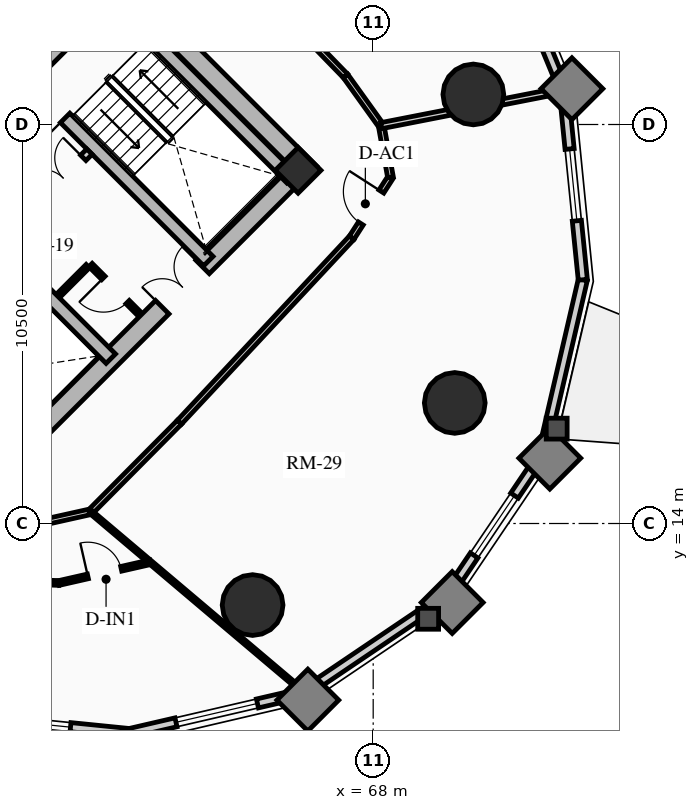
"""IFC4 building model, lengths in metres.
Left out: names, types, materials, properties, quantities, classifications, styles, units other than length and angle.
Written with IfcOpenShell. Run it as: python <this file> out.ifc"""

import sys

from ifc_helpers import new_model, si_unit, direction, frame, frame_2d, origin, origin_2d, place, context, subcontext, project, spatial, rectangle, circle, extrude, source, transform, mapped, element, fill, save


model = new_model("IFC4")
c1 = context("Model", 3, precision=1e-05, world=origin(), true_north=direction((0.0, 1.0)))
c2 = subcontext(c1, "Body", "Model", "MODEL_VIEW")
j1 = project(units=[si_unit("LENGTHUNIT", "METRE"), si_unit("PLANEANGLEUNIT", "RADIAN")], contexts=[c1])
p1 = place(None, origin())
s1 = spatial("IfcSite", under=j1, at=p1, CompositionType="ELEMENT")
p2 = place(p1, origin())
s2 = spatial("IfcBuilding", under=s1, at=p2, CompositionType="ELEMENT")
p3 = place(p2, frame((0.0, 0.0, 22.0)))
s3 = spatial("IfcBuildingStorey", under=s2, at=p3, CompositionType="ELEMENT", Elevation=22.0)
p4 = place(p3, frame((66.339, 23.227, 0.0), z_axis=(0.0, 0.0, 1.0), x_axis=(-0.707106781187, 0.707106781187, 0.0)))
e1 = element("IfcWall", 1, at=p4, inside=s3, PredefinedType="SHEAR", context=c2, shape_type="SweptSolid", body=[
    extrude(rectangle(XDim=14.3, YDim=0.5, at=frame_2d((7.15, 0.0))), origin(), (0.0, 0.0, 1.0), 2.91),
])
p5 = place(p3, frame((58.596, 15.838, 0.0), z_axis=(0.0, 0.0, 1.0), x_axis=(0.707106781187, 0.707106781187, 0.0)))
e2 = element("IfcWall", 2, at=p5, inside=s3, PredefinedType="SHEAR", context=c2, shape_type="SweptSolid", body=[
    extrude(rectangle(XDim=10.7, YDim=0.5, at=frame_2d((5.35, 0.0))), origin(), (0.0, 0.0, 1.0), 2.91),
])
m1 = source(origin(), c2, "Body", "SweptSolid", [
    extrude(rectangle(XDim=1.5, YDim=2.02, at=frame_2d((0.75, 1.01))), frame((0.0, 0.26, 0.0), z_axis=(0.0, -1.0, 0.0), x_axis=(1.0, 0.0, 0.0)), (0.0, 0.0, 1.0), 0.52),
])
p6 = place(p5, frame((5.45, 0.0, 0.0)))
e3 = element("IfcOpeningElement", 3, at=p6, cuts=e2, PredefinedType="OPENING", context=c2, shape_type="MappedRepresentation", body=[
    mapped(m1, transform((0.0, 0.0, 0.0), x_axis=(1.0, 0.0, 0.0), y_axis=(0.0, 1.0, 0.0), z_axis=(0.0, 0.0, 1.0), scale=1.0)),
])
p7 = place(p3, frame((61.096, 18.338, 0.0), z_axis=(0.0, 0.0, 1.0), x_axis=(-0.707106781187, 0.707106781187, 0.0)))
e4 = element("IfcWall", 4, at=p7, inside=s3, PredefinedType="SHEAR", context=c2, shape_type="SweptSolid", body=[
    extrude(rectangle(XDim=13.8, YDim=0.35, at=frame_2d((6.9, 0.0))), origin(), (0.0, 0.0, 1.0), 2.91),
])
m2 = source(origin(), c2, "Body", "SweptSolid", [
    extrude(rectangle(XDim=1.1, YDim=2.015, at=frame_2d((0.55, 1.007))), frame((0.0, 0.185, 0.0), z_axis=(0.0, -1.0, 0.0), x_axis=(1.0, 0.0, 0.0)), (0.0, 0.0, 1.0), 0.37),
])
p8 = place(p7, frame((4.9, 0.0, 0.0)))
e5 = element("IfcOpeningElement", 5, at=p8, cuts=e4, PredefinedType="OPENING", context=c2, shape_type="MappedRepresentation", body=[
    mapped(m2, transform((0.0, 0.0, 0.0), x_axis=(1.0, 0.0, 0.0), y_axis=(0.0, 1.0, 0.0), z_axis=(0.0, 0.0, 1.0), scale=1.0)),
])
m3 = source(origin(), c2, "Body", "SweptSolid", [
    extrude(rectangle(XDim=1.15, YDim=2.02, at=frame_2d((0.575, 1.01))), frame((0.0, 0.185, 0.0), z_axis=(0.0, -1.0, 0.0), x_axis=(1.0, 0.0, 0.0)), (0.0, 0.0, 1.0), 0.37),
])
p9 = place(p7, frame((7.32, 0.0, 0.0)))
e6 = element("IfcOpeningElement", 6, at=p9, cuts=e4, PredefinedType="OPENING", context=c2, shape_type="MappedRepresentation", body=[
    mapped(m3, transform((0.0, 0.0, 0.0), x_axis=(1.0, 0.0, 0.0), y_axis=(0.0, 1.0, 0.0), z_axis=(0.0, 0.0, 1.0), scale=1.0)),
])
p10 = place(p3, frame((63.662, 20.904, 0.0), z_axis=(0.0, 0.0, 1.0), x_axis=(-0.707106781187, 0.707106781187, 0.0)))
e7 = element("IfcWall", 7, at=p10, inside=s3, PredefinedType="SHEAR", context=c2, shape_type="SweptSolid", body=[
    extrude(rectangle(XDim=13.8, YDim=0.35, at=frame_2d((6.9, 0.0))), origin(), (0.0, 0.0, 1.0), 2.91),
])
p11 = place(p10, frame((10.025, 0.0, 0.0)))
e8 = element("IfcOpeningElement", 8, at=p11, cuts=e7, PredefinedType="OPENING", context=c2, shape_type="MappedRepresentation", body=[
    mapped(m2, transform((0.0, 0.0, 0.0), x_axis=(1.0, 0.0, 0.0), y_axis=(0.0, 1.0, 0.0), z_axis=(0.0, 0.0, 1.0), scale=1.0)),
])
p12 = place(p10, frame((12.025, 0.0, 0.0)))
e9 = element("IfcOpeningElement", 9, at=p12, cuts=e7, PredefinedType="OPENING", context=c2, shape_type="MappedRepresentation", body=[
    mapped(m2, transform((0.0, 0.0, 0.0), x_axis=(1.0, 0.0, 0.0), y_axis=(0.0, 1.0, 0.0), z_axis=(0.0, 0.0, 1.0), scale=1.0)),
])
p13 = place(p10, frame((5.33, 0.0, 0.0)))
e10 = element("IfcOpeningElement", 10, at=p13, cuts=e7, PredefinedType="OPENING", context=c2, shape_type="MappedRepresentation", body=[
    mapped(m3, transform((0.0, 0.0, 0.0), x_axis=(1.0, 0.0, 0.0), y_axis=(0.0, 1.0, 0.0), z_axis=(0.0, 0.0, 1.0), scale=1.0)),
])
p14 = place(p3, frame((65.847, 23.089, 0.0), z_axis=(0.0, 0.0, 1.0), x_axis=(-0.707106781187, 0.707106781187, 0.0)))
e11 = element("IfcWall", 11, at=p14, inside=s3, PredefinedType="SHEAR", context=c2, shape_type="SweptSolid", body=[
    extrude(rectangle(XDim=6.745, YDim=0.35, at=frame_2d((3.373, 0.0))), origin(), (0.0, 0.0, 1.0), 2.91),
])
p15 = place(p3, frame((58.893, 25.674, 0.0), z_axis=(0.0, 0.0, 1.0), x_axis=(0.707106781187, 0.707106781187, 0.0)))
e12 = element("IfcWall", 12, at=p15, inside=s3, PredefinedType="SHEAR", context=c2, shape_type="SweptSolid", body=[
    extrude(rectangle(XDim=3.285, YDim=0.35, at=frame_2d((1.643, 0.0))), origin(), (0.0, 0.0, 1.0), 2.91),
])
p16 = place(p3, frame((66.024, 23.294, 0.0), z_axis=(0.0, 0.0, 1.0), x_axis=(0.707106781187, 0.707106781187, 0.0)))
e13 = element("IfcColumn", 13, at=p16, inside=s3, PredefinedType="COLUMN", context=c2, shape_type="SweptSolid", body=[
    extrude(rectangle(XDim=0.85, YDim=0.85, at=origin_2d()), origin(), (0.0, 0.0, 1.0), 2.91),
])
for number, where, z_axis, x_axis in (
    (14, (64.827, 11.854, 0.0), (0.0, 0.0, 1.0), (1.0, 0.0, 0.0)),
    (15, (70.146, 17.173, 0.0), (0.0, 0.0, 1.0), (1.0, 0.0, 0.0)),
    (16, (70.635, 25.291, 0.0), (0.0, 0.0, 1.0), (1.0, 0.0, 0.0)),
):
    element("IfcColumn", number, at=place(p3, frame(where, z_axis=z_axis, x_axis=x_axis)), inside=s3, PredefinedType="USERDEFINED", context=c2, shape_type="SweptSolid", body=[
        extrude(circle(Radius=0.8, at=origin_2d()), origin(), (0.0, 0.0, 1.0), 2.91),
    ])
p17 = place(p3, frame((61.586, 8.484, 0.0), z_axis=(0.0, 0.0, 1.0), x_axis=(-0.994951574538, 0.100356187272, 0.0)))
e17 = element("IfcWall", 17, at=p17, inside=s3, PredefinedType="SOLIDWALL", context=c2, shape_type="SweptSolid", body=[
    extrude(rectangle(XDim=5.019, YDim=0.24, at=frame_2d((2.509, 0.0))), origin(), (0.0, 0.0, 1.0), 2.073),
])
m4 = source(origin(), c2, "Body", "SweptSolid", [
    extrude(rectangle(XDim=1.9, YDim=1.35, at=frame_2d((0.95, 0.675))), frame((0.0, 0.13, 0.0), z_axis=(0.0, -1.0, 0.0), x_axis=(1.0, 0.0, 0.0)), (0.0, 0.0, 1.0), 0.26),
])
p18 = place(p17, frame((1.559, 0.0, 0.65)))
e18 = element("IfcOpeningElement", 18, at=p18, cuts=e17, PredefinedType="OPENING", context=c2, shape_type="MappedRepresentation", body=[
    mapped(m4, transform((0.0, 0.0, 0.0), x_axis=(1.0, 0.0, 0.0), y_axis=(0.0, 1.0, 0.0), z_axis=(0.0, 0.0, 1.0), scale=1.0)),
])
p19 = place(p3, frame((66.18, 9.548, 0.0), z_axis=(0.0, 0.0, 1.0), x_axis=(-0.974197104074, -0.225698919833, 0.0)))
e19 = element("IfcWall", 19, at=p19, inside=s3, PredefinedType="SOLIDWALL", context=c2, shape_type="SweptSolid", body=[
    extrude(rectangle(XDim=4.715, YDim=0.24, at=frame_2d((2.357, 0.0))), origin(), (0.0, 0.0, 1.0), 2.073),
])
m5 = source(origin(), c2, "Body", "SweptSolid", [
    extrude(rectangle(XDim=2.2, YDim=1.35, at=frame_2d((1.1, 0.675))), frame((0.0, 0.13, 0.0), z_axis=(0.0, -1.0, 0.0), x_axis=(1.0, 0.0, 0.0)), (0.0, 0.0, 1.0), 0.26),
])
p20 = place(p19, frame((1.258, 0.0, 0.65)))
e20 = element("IfcOpeningElement", 20, at=p20, cuts=e19, PredefinedType="OPENING", context=c2, shape_type="MappedRepresentation", body=[
    mapped(m5, transform((0.0, 0.0, 0.0), x_axis=(1.0, 0.0, 0.0), y_axis=(0.0, 1.0, 0.0), z_axis=(0.0, 0.0, 1.0), scale=1.0)),
])
p21 = place(p3, frame((69.924, 12.076, 0.0), z_axis=(0.0, 0.0, 1.0), x_axis=(-0.828776615238, -0.559579594012, 0.0)))
e21 = element("IfcWall", 21, at=p21, inside=s3, PredefinedType="SOLIDWALL", context=c2, shape_type="SweptSolid", body=[
    extrude(rectangle(XDim=4.517, YDim=0.24, at=frame_2d((2.259, 0.0))), origin(), (0.0, 0.0, 1.0), 2.073),
])
p22 = place(p3, frame((72.452, 15.82, 0.0), z_axis=(0.0, 0.0, 1.0), x_axis=(-0.559579594012, -0.828776615238, 0.0)))
e22 = element("IfcWall", 22, at=p22, inside=s3, PredefinedType="SOLIDWALL", context=c2, shape_type="SweptSolid", body=[
    extrude(rectangle(XDim=4.517, YDim=0.24, at=frame_2d((2.259, 0.0))), origin(), (0.0, 0.0, 1.0), 2.073),
])
p23 = place(p22, frame((1.309, 0.0, 0.65)))
e23 = element("IfcOpeningElement", 23, at=p23, cuts=e22, PredefinedType="OPENING", context=c2, shape_type="MappedRepresentation", body=[
    mapped(m4, transform((0.0, 0.0, 0.0), x_axis=(1.0, 0.0, 0.0), y_axis=(0.0, 1.0, 0.0), z_axis=(0.0, 0.0, 1.0), scale=1.0)),
])
p24 = place(p3, frame((73.516, 20.414, 0.0), z_axis=(0.0, 0.0, 1.0), x_axis=(-0.225698919833, -0.974197104074, 0.0)))
e24 = element("IfcWall", 24, at=p24, inside=s3, PredefinedType="SOLIDWALL", context=c2, shape_type="SweptSolid", body=[
    extrude(rectangle(XDim=4.715, YDim=0.24, at=frame_2d((2.357, 0.0))), origin(), (0.0, 0.0, 1.0), 2.073),
])
p25 = place(p3, frame((73.012, 25.407, 0.0), z_axis=(0.0, 0.0, 1.0), x_axis=(0.100356187272, -0.994951574538, 0.0)))
e25 = element("IfcWall", 25, at=p25, inside=s3, PredefinedType="SOLIDWALL", context=c2, shape_type="SweptSolid", body=[
    extrude(rectangle(XDim=5.019, YDim=0.24, at=frame_2d((2.509, 0.0))), origin(), (0.0, 0.0, 1.0), 2.073),
])
p26 = place(p25, frame((1.559, 0.0, 0.65)))
e26 = element("IfcOpeningElement", 26, at=p26, cuts=e25, PredefinedType="OPENING", context=c2, shape_type="MappedRepresentation", body=[
    mapped(m4, transform((0.0, 0.0, 0.0), x_axis=(1.0, 0.0, 0.0), y_axis=(0.0, 1.0, 0.0), z_axis=(0.0, 0.0, 1.0), scale=1.0)),
])
p27 = place(p3, frame((70.99, 30.312, 0.0), z_axis=(0.0, 0.0, 1.0), x_axis=(0.381113147118, -0.924528403616, 0.0)))
e27 = element("IfcWall", 27, at=p27, inside=s3, PredefinedType="SOLIDWALL", context=c2, shape_type="SweptSolid", body=[
    extrude(rectangle(XDim=5.305, YDim=0.24, at=frame_2d((2.653, 0.0))), origin(), (0.0, 0.0, 1.0), 2.073),
])
p28 = place(p3, frame((58.214, 21.467, 0.0), z_axis=(0.0, 0.0, 1.0), x_axis=(0.707106781187, 0.707106781187, 0.0)))
e28 = element("IfcWall", 28, at=p28, inside=s3, PredefinedType="PARTITIONING", context=c2, shape_type="SweptSolid", body=[
    extrude(rectangle(XDim=3.28, YDim=0.2, at=frame_2d((1.64, 0.0))), origin(), (0.0, 0.0, 1.0), 2.635),
])
m6 = source(origin(), c2, "Body", "SweptSolid", [
    extrude(rectangle(XDim=1.5, YDim=2.02, at=frame_2d((0.75, 1.01))), frame((0.0, 0.11, 0.0), z_axis=(0.0, -1.0, 0.0), x_axis=(1.0, 0.0, 0.0)), (0.0, 0.0, 1.0), 0.22),
])
p29 = place(p28, frame((1.55, 0.0, 0.0)))
e29 = element("IfcOpeningElement", 29, at=p29, cuts=e28, PredefinedType="OPENING", context=c2, shape_type="MappedRepresentation", body=[
    mapped(m6, transform((0.0, 0.0, 0.0), x_axis=(1.0, 0.0, 0.0), y_axis=(0.0, 1.0, 0.0), z_axis=(0.0, 0.0, 1.0), scale=1.0)),
])
p30 = place(p3, frame((61.835, 19.529, 0.0), z_axis=(0.0, 0.0, 1.0), x_axis=(-0.707174592913, 0.707038962956, 0.0)))
e30 = element("IfcWall", 30, at=p30, inside=s3, PredefinedType="PARTITIONING", context=c2, shape_type="SweptSolid", body=[
    extrude(rectangle(XDim=1.8, YDim=0.125, at=frame_2d((0.9, 0.0))), origin(), (0.0, 0.0, 1.0), 2.635),
])
m7 = source(origin(), c2, "Body", "SweptSolid", [
    extrude(rectangle(XDim=0.9, YDim=2.005, at=frame_2d((0.45, 1.002))), frame((0.0, 0.073, 0.0), z_axis=(0.0, -1.0, 0.0), x_axis=(1.0, 0.0, 0.0)), (0.0, 0.0, 1.0), 0.145),
])
p31 = place(p30, frame((0.42, 0.0, 0.0)))
e31 = element("IfcOpeningElement", 31, at=p31, cuts=e30, PredefinedType="OPENING", context=c2, shape_type="MappedRepresentation", body=[
    mapped(m7, transform((0.0, 0.0, 0.0), x_axis=(1.0, 0.0, 0.0), y_axis=(0.0, 1.0, 0.0), z_axis=(0.0, 0.0, 1.0), scale=1.0)),
])
p32 = place(p3, frame((59.713, 19.996, 0.0), z_axis=(0.0, 0.0, 1.0), x_axis=(0.707217726, 0.706995818963, 0.0)))
e32 = element("IfcWall", 32, at=p32, inside=s3, PredefinedType="PARTITIONING", context=c2, shape_type="SweptSolid", body=[
    extrude(rectangle(XDim=1.1, YDim=0.125, at=frame_2d((0.55, 0.0))), origin(), (0.0, 0.0, 1.0), 2.635),
])
p33 = place(p3, frame((59.008, 13.963, 0.0), z_axis=(0.0, 0.0, 1.0), x_axis=(0.976020856791, 0.21767702476, 0.0)))
e33 = element("IfcWall", 33, at=p33, inside=s3, PredefinedType="PARTITIONING", context=c2, shape_type="SweptSolid", body=[
    extrude(rectangle(XDim=1.593, YDim=0.15, at=frame_2d((0.796, 0.0))), origin(), (0.0, 0.0, 1.0), 2.205),
])
p34 = place(p3, frame((60.562, 14.31, 0.0), z_axis=(0.0, 0.0, 1.0), x_axis=(0.704566236161, 0.709638230975, 0.0)))
e34 = element("IfcWall", 34, at=p34, inside=s3, PredefinedType="PARTITIONING", context=c2, shape_type="SweptSolid", body=[
    extrude(rectangle(XDim=3.321, YDim=0.15, at=frame_2d((1.661, 0.0))), origin(), (0.0, 0.0, 1.0), 2.159),
])
p35 = place(p3, frame((62.903, 16.667, 0.0), z_axis=(0.0, 0.0, 1.0), x_axis=(0.682371947497, 0.731005147225, 0.0)))
e35 = element("IfcWall", 35, at=p35, inside=s3, PredefinedType="PARTITIONING", context=c2, shape_type="SweptSolid", body=[
    extrude(rectangle(XDim=6.642, YDim=0.15, at=frame_2d((3.321, 0.0))), origin(), (0.0, 0.0, 1.0), 2.159),
])
p36 = place(p3, frame((67.435, 21.521, 0.0), z_axis=(0.0, 0.0, 1.0), x_axis=(0.540777197838, 0.841165870859, 0.0)))
e36 = element("IfcWall", 36, at=p36, inside=s3, PredefinedType="PARTITIONING", context=c2, shape_type="SweptSolid", body=[
    extrude(rectangle(XDim=1.888, YDim=0.15, at=frame_2d((0.944, 0.0))), origin(), (0.0, 0.0, 1.0), 2.205),
])
m8 = source(origin(), c2, "Body", "SweptSolid", [
    extrude(rectangle(XDim=1.0, YDim=2.015, at=frame_2d((0.5, 1.007))), frame((0.0, 0.085, 0.0), z_axis=(0.0, -1.0, 0.0), x_axis=(1.0, 0.0, 0.0)), (0.0, 0.0, 1.0), 0.17),
])
p37 = place(p36, frame((0.444, 0.0, 0.0)))
e37 = element("IfcOpeningElement", 37, at=p37, cuts=e36, PredefinedType="OPENING", context=c2, shape_type="MappedRepresentation", body=[
    mapped(m8, transform((0.0, 0.0, 0.0), x_axis=(1.0, 0.0, 0.0), y_axis=(0.0, 1.0, 0.0), z_axis=(0.0, 0.0, 1.0), scale=1.0)),
])
p38 = place(p3, frame((68.456, 23.11, 0.0), z_axis=(0.0, 0.0, 1.0), x_axis=(-0.1772522795, 0.984165448191, 0.0)))
e38 = element("IfcWall", 38, at=p38, inside=s3, PredefinedType="PARTITIONING", context=c2, shape_type="SweptSolid", body=[
    extrude(rectangle(XDim=1.382, YDim=0.15, at=frame_2d((0.691, 0.0))), origin(), (0.0, 0.0, 1.0), 2.159),
])
p39 = place(p3, frame((68.211, 24.469, 0.0), z_axis=(0.0, 0.0, 1.0), x_axis=(-0.583012141368, 0.812463441034, 0.0)))
e39 = element("IfcWall", 39, at=p39, inside=s3, PredefinedType="PARTITIONING", context=c2, shape_type="SweptSolid", body=[
    extrude(rectangle(XDim=1.613, YDim=0.15, at=frame_2d((0.807, 0.0))), origin(), (0.0, 0.0, 1.0), 2.205),
])
p40 = place(p3, frame((67.27, 25.78, 0.0), z_axis=(0.0, 0.0, 1.0), x_axis=(-0.696847842907, 0.717218992942, 0.0)))
e40 = element("IfcWall", 40, at=p40, inside=s3, PredefinedType="PARTITIONING", context=c2, shape_type="SweptSolid", body=[
    extrude(rectangle(XDim=6.004, YDim=0.15, at=frame_2d((3.002, 0.0))), origin(), (0.0, 0.0, 1.0), 2.635),
])
p41 = place(p3, frame((60.562, 14.31, 0.0), z_axis=(0.0, 0.0, 1.0), x_axis=(0.763547638675, -0.645751502881, 0.0)))
e41 = element("IfcWall", 41, at=p41, inside=s3, PredefinedType="MOVABLE", context=c2, shape_type="SweptSolid", body=[
    extrude(rectangle(XDim=7.345, YDim=0.1, at=frame_2d((3.673, 0.0))), origin(), (0.0, 0.0, 1.0), 2.073),
])
p42 = place(p3, frame((68.211, 24.469, 0.0), z_axis=(0.0, 0.0, 1.0), x_axis=(0.981421381452, 0.19186472325, 0.0)))
e42 = element("IfcWall", 42, at=p42, inside=s3, PredefinedType="PARTITIONING", context=c2, shape_type="SweptSolid", body=[
    extrude(rectangle(XDim=4.872, YDim=0.16, at=frame_2d((2.436, 0.0))), origin(), (0.0, 0.0, 1.0), 2.073),
])
p43 = place(p3, frame((57.255, 12.528, 0.0), z_axis=(0.0, 0.0, 1.0), x_axis=(0.999290303909, -0.037668136579, 0.0)))
e43 = element("IfcWall", 43, at=p43, inside=s3, PredefinedType="PARTITIONING", context=c2, shape_type="SweptSolid", body=[
    extrude(rectangle(XDim=2.476, YDim=0.125, at=frame_2d((1.238, 0.0))), origin(), (0.0, 0.0, 1.0), 2.159),
])
p44 = place(p3, frame((59.729, 12.434, 0.0), z_axis=(0.0, 0.0, 1.0), x_axis=(0.975062765266, 0.221929276555, 0.0)))
e44 = element("IfcWall", 44, at=p44, inside=s3, PredefinedType="PARTITIONING", context=c2, shape_type="SweptSolid", body=[
    extrude(rectangle(XDim=2.465, YDim=0.125, at=frame_2d((1.233, 0.0))), origin(), (0.0, 0.0, 1.0), 2.205),
])
p45 = place(p44, frame((0.783, 0.0, 0.0)))
e45 = element("IfcOpeningElement", 45, at=p45, cuts=e44, PredefinedType="OPENING", context=c2, shape_type="MappedRepresentation", body=[
    mapped(m7, transform((0.0, 0.0, 0.0), x_axis=(1.0, 0.0, 0.0), y_axis=(0.0, 1.0, 0.0), z_axis=(0.0, 0.0, 1.0), scale=1.0)),
])
m9 = source(origin(), c2, "Body", "SweptSolid", [
    extrude(rectangle(XDim=1.9, YDim=1.35, at=frame_2d((0.95, 0.675))), frame((0.0, 0.03, 0.0), z_axis=(0.0, -1.0, 0.0), x_axis=(1.0, 0.0, 0.0)), (0.0, 0.0, 1.0), 0.06),
])
p46 = place(p18, origin())
e46 = element("IfcWindow", 46, at=p46, inside=s3, PartitioningType="DOUBLE_PANEL_VERTICAL", PredefinedType="WINDOW", context=c2, shape_type="MappedRepresentation", body=[
    mapped(m9, transform((0.0, 0.0, 0.0), x_axis=(1.0, 0.0, 0.0), y_axis=(0.0, 1.0, 0.0), z_axis=(0.0, 0.0, 1.0), scale=1.0)),
])
fill(e18, e46)
m10 = source(origin(), c2, "Body", "SweptSolid", [
    extrude(rectangle(XDim=2.2, YDim=1.35, at=frame_2d((1.1, 0.675))), frame((0.0, 0.03, 0.0), z_axis=(0.0, -1.0, 0.0), x_axis=(1.0, 0.0, 0.0)), (0.0, 0.0, 1.0), 0.06),
])
p47 = place(p20, origin())
e47 = element("IfcWindow", 47, at=p47, inside=s3, PartitioningType="DOUBLE_PANEL_VERTICAL", PredefinedType="WINDOW", context=c2, shape_type="MappedRepresentation", body=[
    mapped(m10, transform((0.0, 0.0, 0.0), x_axis=(1.0, 0.0, 0.0), y_axis=(0.0, 1.0, 0.0), z_axis=(0.0, 0.0, 1.0), scale=1.0)),
])
fill(e20, e47)
p48 = place(p23, origin())
e48 = element("IfcWindow", 48, at=p48, inside=s3, PartitioningType="DOUBLE_PANEL_VERTICAL", PredefinedType="WINDOW", context=c2, shape_type="MappedRepresentation", body=[
    mapped(m9, transform((0.0, 0.0, 0.0), x_axis=(1.0, 0.0, 0.0), y_axis=(0.0, 1.0, 0.0), z_axis=(0.0, 0.0, 1.0), scale=1.0)),
])
fill(e23, e48)
p49 = place(p26, origin())
e49 = element("IfcWindow", 49, at=p49, inside=s3, PartitioningType="DOUBLE_PANEL_VERTICAL", PredefinedType="WINDOW", context=c2, shape_type="MappedRepresentation", body=[
    mapped(m9, transform((0.0, 0.0, 0.0), x_axis=(1.0, 0.0, 0.0), y_axis=(0.0, 1.0, 0.0), z_axis=(0.0, 0.0, 1.0), scale=1.0)),
])
fill(e26, e49)
m11 = source(origin(), c2, "Body", "SweptSolid", [
    extrude(rectangle(XDim=1.15, YDim=2.02, at=frame_2d((0.575, 1.01))), frame((0.0, 0.025, 0.0), z_axis=(0.0, -1.0, 0.0), x_axis=(1.0, 0.0, 0.0)), (0.0, 0.0, 1.0), 0.05),
])
p50 = place(p13, origin())
e50 = element("IfcDoor", 50, at=p50, inside=s3, OperationType="SINGLE_SWING_LEFT", PredefinedType="DOOR", context=c2, shape_type="MappedRepresentation", body=[
    mapped(m11, transform((0.0, 0.0, 0.0), x_axis=(1.0, 0.0, 0.0), y_axis=(0.0, 1.0, 0.0), z_axis=(0.0, 0.0, 1.0), scale=1.0)),
])
fill(e10, e50)
m12 = source(origin(), c2, "Body", "SweptSolid", [
    extrude(rectangle(XDim=1.5, YDim=2.02, at=frame_2d((0.75, 1.01))), frame((0.0, 0.025, 0.0), z_axis=(0.0, -1.0, 0.0), x_axis=(1.0, 0.0, 0.0)), (0.0, 0.0, 1.0), 0.05),
])
p51 = place(p6, origin())
e51 = element("IfcDoor", 51, at=p51, inside=s3, OperationType="DOUBLE_DOOR_SINGLE_SWING", PredefinedType="DOOR", context=c2, shape_type="MappedRepresentation", body=[
    mapped(m12, transform((0.0, 0.0, 0.0), x_axis=(1.0, 0.0, 0.0), y_axis=(0.0, 1.0, 0.0), z_axis=(0.0, 0.0, 1.0), scale=1.0)),
])
fill(e3, e51)
p52 = place(p29, origin())
e52 = element("IfcDoor", 52, at=p52, inside=s3, OperationType="DOUBLE_DOOR_SINGLE_SWING", PredefinedType="DOOR", context=c2, shape_type="MappedRepresentation", body=[
    mapped(m12, transform((0.0, 0.0, 0.0), x_axis=(1.0, 0.0, 0.0), y_axis=(0.0, 1.0, 0.0), z_axis=(0.0, 0.0, 1.0), scale=1.0)),
])
fill(e29, e52)
m13 = source(origin(), c2, "Body", "SweptSolid", [
    extrude(rectangle(XDim=0.9, YDim=2.005, at=frame_2d((0.45, 1.002))), frame((0.0, 0.025, 0.0), z_axis=(0.0, -1.0, 0.0), x_axis=(1.0, 0.0, 0.0)), (0.0, 0.0, 1.0), 0.05),
])
p53 = place(p31, origin())
e53 = element("IfcDoor", 53, at=p53, inside=s3, OperationType="SINGLE_SWING_RIGHT", PredefinedType="DOOR", context=c2, shape_type="MappedRepresentation", body=[
    mapped(m13, transform((0.0, 0.0, 0.0), x_axis=(1.0, 0.0, 0.0), y_axis=(0.0, 1.0, 0.0), z_axis=(0.0, 0.0, 1.0), scale=1.0)),
])
fill(e31, e53)
p54 = place(p45, origin())
e54 = element("IfcDoor", 54, at=p54, inside=s3, OperationType="SINGLE_SWING_LEFT", PredefinedType="DOOR", context=c2, shape_type="MappedRepresentation", body=[
    mapped(m13, transform((0.0, 0.0, 0.0), x_axis=(1.0, 0.0, 0.0), y_axis=(0.0, 1.0, 0.0), z_axis=(0.0, 0.0, 1.0), scale=1.0)),
])
fill(e45, e54)
m14 = source(origin(), c2, "Body", "SweptSolid", [
    extrude(rectangle(XDim=1.0, YDim=2.015, at=frame_2d((0.5, 1.007))), frame((0.0, 0.025, 0.0), z_axis=(0.0, -1.0, 0.0), x_axis=(1.0, 0.0, 0.0)), (0.0, 0.0, 1.0), 0.05),
])
p55 = place(p37, origin())
e55 = element("IfcDoor", 55, at=p55, inside=s3, OperationType="SINGLE_SWING_RIGHT", PredefinedType="DOOR", context=c2, shape_type="MappedRepresentation", body=[
    mapped(m14, transform((0.0, 0.0, 0.0), x_axis=(1.0, 0.0, 0.0), y_axis=(0.0, 1.0, 0.0), z_axis=(0.0, 0.0, 1.0), scale=1.0)),
])
fill(e37, e55)
save(model, sys.argv[1])
